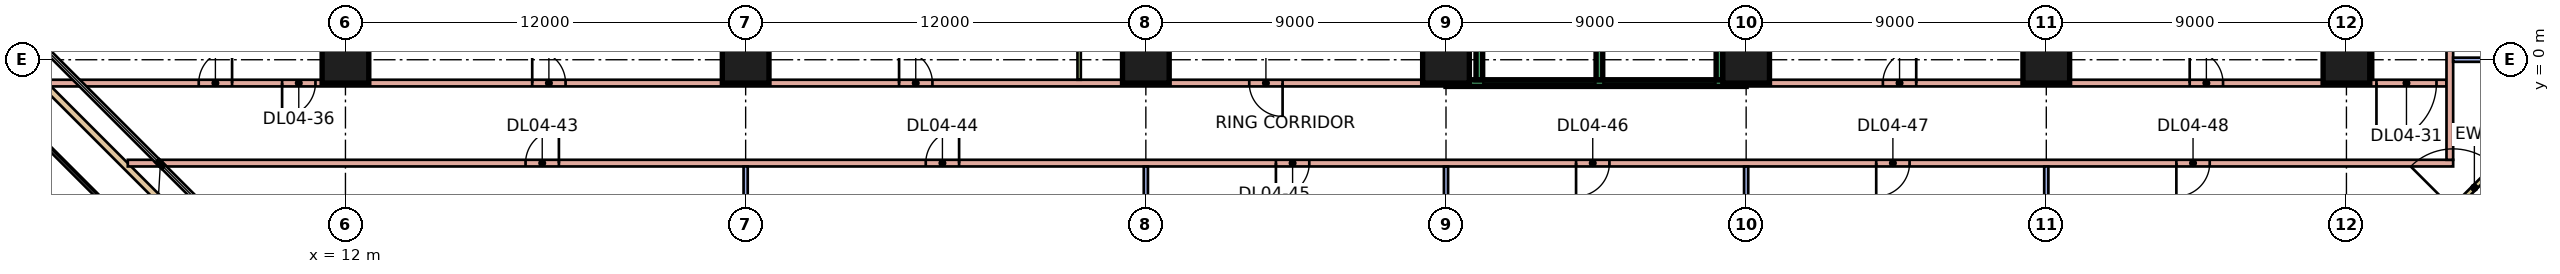
"""IFC4 building model, lengths in metres.
Left out: names, types, materials, properties, quantities, classifications, styles, units other than length and angle.
Written with IfcOpenShell. Run it as: python <this file> out.ifc"""

import sys

from ifc_helpers import new_model, si_unit, direction, frame, frame_2d, origin, origin_2d, place, context, subcontext, project, spatial, rectangle, extrude, element, fill, save


model = new_model("IFC4")
c1 = context("Model", 3, precision=1e-05, world=origin(), true_north=direction((0.0, 1.0)))
c2 = subcontext(c1, "Body", "Model", "MODEL_VIEW")
j1 = project(units=[si_unit("LENGTHUNIT", "METRE"), si_unit("PLANEANGLEUNIT", "RADIAN")], contexts=[c1])
p1 = place(None, origin())
s1 = spatial("IfcSite", under=j1, at=p1, CompositionType="ELEMENT")
p2 = place(p1, origin())
s2 = spatial("IfcBuilding", under=s1, at=p2, CompositionType="ELEMENT")
p3 = place(p2, frame((0.0, 0.0, 21.6)))
s3 = spatial("IfcBuildingStorey", under=s2, at=p3, CompositionType="ELEMENT", Elevation=21.6)
for number, where, z_axis, x_axis in (
    (1, (12.0, 0.0, 0.0), (0.0, 0.0, 1.0), (1.0, 0.0, 0.0)),
    (2, (24.0, 0.0, 0.0), (0.0, 0.0, 1.0), (1.0, 0.0, 0.0)),
    (3, (36.0, 0.0, 0.0), (0.0, 0.0, 1.0), (1.0, 0.0, 0.0)),
    (4, (45.0, 0.0, 0.0), (0.0, 0.0, 1.0), (1.0, 0.0, 0.0)),
    (5, (54.0, 0.0, 0.0), (0.0, 0.0, 1.0), (1.0, 0.0, 0.0)),
    (6, (63.0, 0.0, 0.0), (0.0, 0.0, 1.0), (1.0, 0.0, 0.0)),
    (7, (72.0, 0.0, 0.0), (0.0, 0.0, 1.0), (1.0, 0.0, 0.0)),
):
    element("IfcColumn", number, at=place(p3, frame(where, z_axis=z_axis, x_axis=x_axis)), inside=s3, PredefinedType="COLUMN", context=c2, shape_type="SweptSolid", body=[
        extrude(rectangle(XDim=1.4, YDim=1.4, at=origin_2d()), origin(), (0.0, 0.0, 1.0), 4.8),
    ])
p4 = place(p3, frame((74.775, -4.897, 0.0), z_axis=(0.0, 0.0, 1.0), x_axis=(0.707106781187, 0.707106781187, 0.0)))
e8 = element("IfcWall", 8, at=p4, inside=s3, PredefinedType="SOLIDWALL", context=c2, shape_type="SweptSolid", body=[
    extrude(rectangle(XDim=3.0, YDim=0.15, at=frame_2d((1.5, 0.0))), origin(), (0.0, 0.0, 1.0), 4.4),
])
p5 = place(p4, frame((0.6, 0.0, 0.0)))
e9 = element("IfcOpeningElement", 9, at=p5, cuts=e8, PredefinedType="OPENING", context=c2, shape_type="SweptSolid", body=[
    extrude(rectangle(XDim=1.8, YDim=2.4, at=frame_2d((0.9, 1.2))), frame((0.0, 0.085, 0.0), z_axis=(0.0, -1.0, 0.0), x_axis=(1.0, 0.0, 0.0)), (0.0, 0.0, 1.0), 0.17),
])
p6 = place(p3, frame((79.7, -1.068, 0.0), z_axis=(0.0, 0.0, 1.0), x_axis=(-0.707106781187, -0.707106781187, 0.0)))
e10 = element("IfcWall", 10, at=p6, inside=s3, PredefinedType="PARAPET", context=c2, shape_type="SweptSolid", body=[
    extrude(rectangle(XDim=9.379, YDim=0.2, at=frame_2d((4.689, 0.0))), origin(), (0.0, 0.0, 1.0), 0.5),
])
p7 = place(p3, frame((9.932, -7.7, 0.0), z_axis=(0.0, 0.0, 1.0), x_axis=(-0.707106781187, 0.707106781187, 0.0)))
e11 = element("IfcWall", 11, at=p7, inside=s3, PredefinedType="PARAPET", context=c2, shape_type="SweptSolid", body=[
    extrude(rectangle(XDim=24.935, YDim=0.2, at=frame_2d((12.468, 0.0))), origin(), (0.0, 0.0, 1.0), 0.5),
])
p8 = place(p3, frame((3.073, -0.7, 0.0), z_axis=(0.0, 0.0, 1.0), x_axis=(1.0, 0.0, 0.0)))
e12 = element("IfcWall", 12, at=p8, inside=s3, PredefinedType="PARTITIONING", context=c2, shape_type="SweptSolid", body=[
    extrude(rectangle(XDim=41.927, YDim=0.2, at=frame_2d((20.963, 0.0))), origin(), (0.0, 0.0, 1.0), 4.4),
])
p9 = place(p8, frame((36.027, 0.0, 0.0)))
e13 = element("IfcOpeningElement", 13, at=p9, cuts=e12, PredefinedType="OPENING", context=c2, shape_type="SweptSolid", body=[
    extrude(rectangle(XDim=1.0, YDim=2.1, at=frame_2d((0.5, 1.05))), frame((0.0, 0.11, 0.0), z_axis=(0.0, -1.0, 0.0), x_axis=(1.0, 0.0, 0.0)), (0.0, 0.0, 1.0), 0.22),
])
p10 = place(p8, frame((4.527, 0.0, 0.0)))
e14 = element("IfcOpeningElement", 14, at=p10, cuts=e12, PredefinedType="OPENING", context=c2, shape_type="SweptSolid", body=[
    extrude(rectangle(XDim=1.0, YDim=2.1, at=frame_2d((0.5, 1.05))), frame((0.0, 0.11, 0.0), z_axis=(0.0, -1.0, 0.0), x_axis=(1.0, 0.0, 0.0)), (0.0, 0.0, 1.0), 0.22),
])
p11 = place(p8, frame((7.027, 0.0, 0.0)))
e15 = element("IfcOpeningElement", 15, at=p11, cuts=e12, PredefinedType="OPENING", context=c2, shape_type="SweptSolid", body=[
    extrude(rectangle(XDim=1.0, YDim=2.1, at=frame_2d((0.5, 1.05))), frame((0.0, 0.11, 0.0), z_axis=(0.0, -1.0, 0.0), x_axis=(1.0, 0.0, 0.0)), (0.0, 0.0, 1.0), 0.22),
])
p12 = place(p8, frame((14.527, 0.0, 0.0)))
e16 = element("IfcOpeningElement", 16, at=p12, cuts=e12, PredefinedType="OPENING", context=c2, shape_type="SweptSolid", body=[
    extrude(rectangle(XDim=1.0, YDim=2.1, at=frame_2d((0.5, 1.05))), frame((0.0, 0.11, 0.0), z_axis=(0.0, -1.0, 0.0), x_axis=(1.0, 0.0, 0.0)), (0.0, 0.0, 1.0), 0.22),
])
p13 = place(p8, frame((25.527, 0.0, 0.0)))
e17 = element("IfcOpeningElement", 17, at=p13, cuts=e12, PredefinedType="OPENING", context=c2, shape_type="SweptSolid", body=[
    extrude(rectangle(XDim=1.0, YDim=2.1, at=frame_2d((0.5, 1.05))), frame((0.0, 0.11, 0.0), z_axis=(0.0, -1.0, 0.0), x_axis=(1.0, 0.0, 0.0)), (0.0, 0.0, 1.0), 0.22),
])
p14 = place(p3, frame((5.473, -3.1, 0.0), z_axis=(0.0, 0.0, 1.0), x_axis=(1.0, 0.0, 0.0)))
e18 = element("IfcWall", 18, at=p14, inside=s3, PredefinedType="PARTITIONING", context=c2, shape_type="SweptSolid", body=[
    extrude(rectangle(XDim=69.727, YDim=0.2, at=frame_2d((34.863, 0.0))), origin(), (0.0, 0.0, 1.0), 4.4),
])
p15 = place(p14, frame((11.927, 0.0, 0.0)))
e19 = element("IfcOpeningElement", 19, at=p15, cuts=e18, PredefinedType="OPENING", context=c2, shape_type="SweptSolid", body=[
    extrude(rectangle(XDim=1.0, YDim=2.1, at=frame_2d((0.5, 1.05))), frame((0.0, 0.11, 0.0), z_axis=(0.0, -1.0, 0.0), x_axis=(1.0, 0.0, 0.0)), (0.0, 0.0, 1.0), 0.22),
])
p16 = place(p14, frame((23.927, 0.0, 0.0)))
e20 = element("IfcOpeningElement", 20, at=p16, cuts=e18, PredefinedType="OPENING", context=c2, shape_type="SweptSolid", body=[
    extrude(rectangle(XDim=1.0, YDim=2.1, at=frame_2d((0.5, 1.05))), frame((0.0, 0.11, 0.0), z_axis=(0.0, -1.0, 0.0), x_axis=(1.0, 0.0, 0.0)), (0.0, 0.0, 1.0), 0.22),
])
p17 = place(p14, frame((34.427, 0.0, 0.0)))
e21 = element("IfcOpeningElement", 21, at=p17, cuts=e18, PredefinedType="OPENING", context=c2, shape_type="SweptSolid", body=[
    extrude(rectangle(XDim=1.0, YDim=2.1, at=frame_2d((0.5, 1.05))), frame((0.0, 0.11, 0.0), z_axis=(0.0, -1.0, 0.0), x_axis=(1.0, 0.0, 0.0)), (0.0, 0.0, 1.0), 0.22),
])
p18 = place(p14, frame((43.427, 0.0, 0.0)))
e22 = element("IfcOpeningElement", 22, at=p18, cuts=e18, PredefinedType="OPENING", context=c2, shape_type="SweptSolid", body=[
    extrude(rectangle(XDim=1.0, YDim=2.1, at=frame_2d((0.5, 1.05))), frame((0.0, 0.11, 0.0), z_axis=(0.0, -1.0, 0.0), x_axis=(1.0, 0.0, 0.0)), (0.0, 0.0, 1.0), 0.22),
])
p19 = place(p14, frame((52.427, 0.0, 0.0)))
e23 = element("IfcOpeningElement", 23, at=p19, cuts=e18, PredefinedType="OPENING", context=c2, shape_type="SweptSolid", body=[
    extrude(rectangle(XDim=1.0, YDim=2.1, at=frame_2d((0.5, 1.05))), frame((0.0, 0.11, 0.0), z_axis=(0.0, -1.0, 0.0), x_axis=(1.0, 0.0, 0.0)), (0.0, 0.0, 1.0), 0.22),
])
p20 = place(p14, frame((61.427, 0.0, 0.0)))
e24 = element("IfcOpeningElement", 24, at=p20, cuts=e18, PredefinedType="OPENING", context=c2, shape_type="SweptSolid", body=[
    extrude(rectangle(XDim=1.0, YDim=2.1, at=frame_2d((0.5, 1.05))), frame((0.0, 0.11, 0.0), z_axis=(0.0, -1.0, 0.0), x_axis=(1.0, 0.0, 0.0)), (0.0, 0.0, 1.0), 0.22),
])
p21 = place(p3, frame((12.0, -0.6, 0.0), z_axis=(0.0, 0.0, 1.0), x_axis=(0.0, 1.0, 0.0)))
e25 = element("IfcWall", 25, at=p21, inside=s3, PredefinedType="PARTITIONING", context=c2, shape_type="SweptSolid", body=[
    extrude(rectangle(XDim=7.6, YDim=0.125, at=frame_2d((3.8, 0.0))), origin(), (0.0, 0.0, 1.0), 4.4),
])
p22 = place(p3, frame((24.0, -7.6, 0.0), z_axis=(0.0, 0.0, 1.0), x_axis=(0.0, 1.0, 0.0)))
e26 = element("IfcWall", 26, at=p22, inside=s3, PredefinedType="PARTITIONING", context=c2, shape_type="SweptSolid", body=[
    extrude(rectangle(XDim=4.4, YDim=0.125, at=frame_2d((2.2, 0.0))), origin(), (0.0, 0.0, 1.0), 4.4),
])
for number, where, z_axis, x_axis in (
    (27, (24.0, -0.6, 0.0), (0.0, 0.0, 1.0), (0.0, 1.0, 0.0)),
    (28, (34.0, -0.6, 0.0), (0.0, 0.0, 1.0), (0.0, 1.0, 0.0)),
):
    element("IfcWall", number, at=place(p3, frame(where, z_axis=z_axis, x_axis=x_axis)), inside=s3, PredefinedType="PARTITIONING", context=c2, shape_type="SweptSolid", body=[
        extrude(rectangle(XDim=7.6, YDim=0.1, at=frame_2d((3.8, 0.0))), origin(), (0.0, 0.0, 1.0), 4.4),
    ])
p23 = place(p3, frame((36.0, -6.851, 0.0), z_axis=(0.0, 0.0, 1.0), x_axis=(0.0, 1.0, 0.0)))
e29 = element("IfcWall", 29, at=p23, inside=s3, PredefinedType="PARTITIONING", context=c2, shape_type="SweptSolid", body=[
    extrude(rectangle(XDim=3.651, YDim=0.125, at=frame_2d((1.826, 0.0))), origin(), (0.0, 0.0, 1.0), 4.4),
])
p24 = place(p3, frame((45.0, -7.6, 0.0), z_axis=(0.0, 0.0, 1.0), x_axis=(0.0, 1.0, 0.0)))
e30 = element("IfcWall", 30, at=p24, inside=s3, PredefinedType="PARTITIONING", context=c2, shape_type="SweptSolid", body=[
    extrude(rectangle(XDim=4.4, YDim=0.125, at=frame_2d((2.2, 0.0))), origin(), (0.0, 0.0, 1.0), 4.4),
])
p25 = place(p3, frame((45.0, -0.7, 0.0), z_axis=(0.0, 0.0, 1.0), x_axis=(1.0, 0.0, 0.0)))
e31 = element("IfcWall", 31, at=p25, inside=s3, PredefinedType="SOLIDWALL", context=c2, shape_type="SweptSolid", body=[
    extrude(rectangle(XDim=9.0, YDim=0.2, at=frame_2d((4.5, 0.0))), origin(), (0.0, 0.0, 1.0), 4.4),
])
for number, where, z_axis, x_axis in (
    (32, (45.0, -0.6, 0.0), (0.0, 0.0, 1.0), (0.0, 1.0, 0.0)),
    (33, (49.6, -0.6, 0.0), (0.0, 0.0, 1.0), (0.0, 1.0, 0.0)),
):
    element("IfcWall", number, at=place(p3, frame(where, z_axis=z_axis, x_axis=x_axis)), inside=s3, PredefinedType="SOLIDWALL", context=c2, shape_type="SweptSolid", body=[
        extrude(rectangle(XDim=13.1, YDim=0.2, at=frame_2d((6.55, 0.0))), origin(), (0.0, 0.0, 1.0), 4.4),
    ])
p26 = place(p3, frame((54.0, -7.6, 0.0), z_axis=(0.0, 0.0, 1.0), x_axis=(0.0, 1.0, 0.0)))
e34 = element("IfcWall", 34, at=p26, inside=s3, PredefinedType="PARTITIONING", context=c2, shape_type="SweptSolid", body=[
    extrude(rectangle(XDim=4.4, YDim=0.125, at=frame_2d((2.2, 0.0))), origin(), (0.0, 0.0, 1.0), 4.4),
])
p27 = place(p3, frame((54.0, -0.7, 0.0), z_axis=(0.0, 0.0, 1.0), x_axis=(1.0, 0.0, 0.0)))
e35 = element("IfcWall", 35, at=p27, inside=s3, PredefinedType="PARTITIONING", context=c2, shape_type="SweptSolid", body=[
    extrude(rectangle(XDim=21.0, YDim=0.2, at=frame_2d((10.5, 0.0))), origin(), (0.0, 0.0, 1.0), 4.4),
])
p28 = place(p27, frame((4.1, 0.0, 0.0)))
e36 = element("IfcOpeningElement", 36, at=p28, cuts=e35, PredefinedType="OPENING", context=c2, shape_type="SweptSolid", body=[
    extrude(rectangle(XDim=1.0, YDim=2.1, at=frame_2d((0.5, 1.05))), frame((0.0, 0.11, 0.0), z_axis=(0.0, -1.0, 0.0), x_axis=(1.0, 0.0, 0.0)), (0.0, 0.0, 1.0), 0.22),
])
p29 = place(p27, frame((13.3, 0.0, 0.0)))
e37 = element("IfcOpeningElement", 37, at=p29, cuts=e35, PredefinedType="OPENING", context=c2, shape_type="SweptSolid", body=[
    extrude(rectangle(XDim=1.0, YDim=2.1, at=frame_2d((0.5, 1.05))), frame((0.0, 0.11, 0.0), z_axis=(0.0, -1.0, 0.0), x_axis=(1.0, 0.0, 0.0)), (0.0, 0.0, 1.0), 0.22),
])
p30 = place(p27, frame((18.9, 0.0, 0.0)))
e38 = element("IfcOpeningElement", 38, at=p30, cuts=e35, PredefinedType="OPENING", context=c2, shape_type="SweptSolid", body=[
    extrude(rectangle(XDim=1.8, YDim=2.1, at=frame_2d((0.9, 1.05))), frame((0.0, 0.11, 0.0), z_axis=(0.0, -1.0, 0.0), x_axis=(1.0, 0.0, 0.0)), (0.0, 0.0, 1.0), 0.22),
])
p31 = place(p3, frame((54.0, -0.6, 0.0), z_axis=(0.0, 0.0, 1.0), x_axis=(0.0, 1.0, 0.0)))
e39 = element("IfcWall", 39, at=p31, inside=s3, PredefinedType="SOLIDWALL", context=c2, shape_type="SweptSolid", body=[
    extrude(rectangle(XDim=13.1, YDim=0.2, at=frame_2d((6.55, 0.0))), origin(), (0.0, 0.0, 1.0), 4.4),
])
p32 = place(p3, frame((63.0, -7.6, 0.0), z_axis=(0.0, 0.0, 1.0), x_axis=(0.0, 1.0, 0.0)))
e40 = element("IfcWall", 40, at=p32, inside=s3, PredefinedType="PARTITIONING", context=c2, shape_type="SweptSolid", body=[
    extrude(rectangle(XDim=4.4, YDim=0.125, at=frame_2d((2.2, 0.0))), origin(), (0.0, 0.0, 1.0), 4.4),
])
p33 = place(p3, frame((63.0, -0.6, 0.0), z_axis=(0.0, 0.0, 1.0), x_axis=(0.0, 1.0, 0.0)))
e41 = element("IfcWall", 41, at=p33, inside=s3, PredefinedType="PARTITIONING", context=c2, shape_type="SweptSolid", body=[
    extrude(rectangle(XDim=13.1, YDim=0.1, at=frame_2d((6.55, 0.0))), origin(), (0.0, 0.0, 1.0), 4.4),
])
p34 = place(p3, frame((72.7, -0.6, 0.0), z_axis=(0.0, 0.0, 1.0), x_axis=(0.0, 1.0, 0.0)))
e42 = element("IfcWall", 42, at=p34, inside=s3, PredefinedType="PARTITIONING", context=c2, shape_type="SweptSolid", body=[
    extrude(rectangle(XDim=13.1, YDim=0.2, at=frame_2d((6.55, 0.0))), origin(), (0.0, 0.0, 1.0), 4.4),
])
p35 = place(p34, frame((6.05, 0.0, 0.0)))
e43 = element("IfcOpeningElement", 43, at=p35, cuts=e42, PredefinedType="OPENING", context=c2, shape_type="SweptSolid", body=[
    extrude(rectangle(XDim=1.0, YDim=2.1, at=frame_2d((0.5, 1.05))), frame((0.0, 0.11, 0.0), z_axis=(0.0, -1.0, 0.0), x_axis=(1.0, 0.0, 0.0)), (0.0, 0.0, 1.0), 0.22),
])
p36 = place(p3, frame((75.1, -3.0, 0.0), z_axis=(0.0, 0.0, 1.0), x_axis=(0.0, 1.0, 0.0)))
e44 = element("IfcWall", 44, at=p36, inside=s3, PredefinedType="PARTITIONING", context=c2, shape_type="SweptSolid", body=[
    extrude(rectangle(XDim=30.0, YDim=0.2, at=frame_2d((15.0, 0.0))), origin(), (0.0, 0.0, 1.0), 4.4),
])
p37 = place(p36, frame((8.4, 0.0, 0.0)))
e45 = element("IfcOpeningElement", 45, at=p37, cuts=e44, PredefinedType="OPENING", context=c2, shape_type="SweptSolid", body=[
    extrude(rectangle(XDim=1.0, YDim=2.1, at=frame_2d((0.5, 1.05))), frame((0.0, 0.11, 0.0), z_axis=(0.0, -1.0, 0.0), x_axis=(1.0, 0.0, 0.0)), (0.0, 0.0, 1.0), 0.22),
])
p38 = place(p36, frame((22.25, 0.0, 0.0)))
e46 = element("IfcOpeningElement", 46, at=p38, cuts=e44, PredefinedType="OPENING", context=c2, shape_type="SweptSolid", body=[
    extrude(rectangle(XDim=1.0, YDim=2.1, at=frame_2d((0.5, 1.05))), frame((0.0, 0.11, 0.0), z_axis=(0.0, -1.0, 0.0), x_axis=(1.0, 0.0, 0.0)), (0.0, 0.0, 1.0), 0.22),
])
p39 = place(p3, frame((75.2, 0.0, 0.0), z_axis=(0.0, 0.0, 1.0), x_axis=(1.0, 0.0, 0.0)))
e47 = element("IfcWall", 47, at=p39, inside=s3, PredefinedType="PARTITIONING", context=c2, shape_type="SweptSolid", body=[
    extrude(rectangle(XDim=4.4, YDim=0.125, at=frame_2d((2.2, 0.0))), origin(), (0.0, 0.0, 1.0), 4.4),
])
for number, where, z_axis, x_axis in (
    (48, (53.2, -0.6, 0.0), (0.0, 0.0, 1.0), (0.0, 1.0, 0.0)),
    (49, (46.0, -0.6, 0.0), (0.0, 0.0, 1.0), (0.0, 1.0, 0.0)),
):
    element("IfcWall", number, at=place(p3, frame(where, z_axis=z_axis, x_axis=x_axis)), inside=s3, PredefinedType="SOLIDWALL", context=c2, shape_type="SweptSolid", body=[
        extrude(rectangle(XDim=7.945, YDim=0.2, at=frame_2d((3.973, 0.0))), origin(), (0.0, 0.0, 1.0), 4.4),
    ])
p40 = place(p5, origin())
e50 = element("IfcDoor", 50, at=p40, inside=s3, OperationType="DOUBLE_DOOR_SINGLE_SWING", PredefinedType="DOOR", context=c2, shape_type="SweptSolid", body=[
    extrude(rectangle(XDim=1.8, YDim=2.4, at=frame_2d((0.9, 1.2))), frame((0.0, 0.025, 0.0), z_axis=(0.0, -1.0, 0.0), x_axis=(1.0, 0.0, 0.0)), (0.0, 0.0, 1.0), 0.05),
])
fill(e9, e50)
p41 = place(p9, origin())
e51 = element("IfcDoor", 51, at=p41, inside=s3, OperationType="SINGLE_SWING_RIGHT", PredefinedType="DOOR", context=c2, shape_type="SweptSolid", body=[
    extrude(rectangle(XDim=1.0, YDim=2.1, at=frame_2d((0.5, 1.05))), frame((0.0, 0.025, 0.0), z_axis=(0.0, -1.0, 0.0), x_axis=(1.0, 0.0, 0.0)), (0.0, 0.0, 1.0), 0.05),
])
fill(e13, e51)
p42 = place(p28, frame((1.0, 0.0, 0.0), z_axis=(0.0, 0.0, 1.0), x_axis=(-1.0, 0.0, 0.0)))
e52 = element("IfcDoor", 52, at=p42, inside=s3, OperationType="SINGLE_SWING_RIGHT", PredefinedType="DOOR", context=c2, shape_type="SweptSolid", body=[
    extrude(rectangle(XDim=1.0, YDim=2.1, at=frame_2d((0.5, 1.05))), frame((0.0, 0.025, 0.0), z_axis=(0.0, -1.0, 0.0), x_axis=(1.0, 0.0, 0.0)), (0.0, 0.0, 1.0), 0.05),
])
fill(e36, e52)
p43 = place(p29, origin())
e53 = element("IfcDoor", 53, at=p43, inside=s3, OperationType="SINGLE_SWING_LEFT", PredefinedType="DOOR", context=c2, shape_type="SweptSolid", body=[
    extrude(rectangle(XDim=1.0, YDim=2.1, at=frame_2d((0.5, 1.05))), frame((0.0, 0.025, 0.0), z_axis=(0.0, -1.0, 0.0), x_axis=(1.0, 0.0, 0.0)), (0.0, 0.0, 1.0), 0.05),
])
fill(e37, e53)
p44 = place(p30, frame((1.8, 0.0, 0.0), z_axis=(0.0, 0.0, 1.0), x_axis=(-1.0, 0.0, 0.0)))
e54 = element("IfcDoor", 54, at=p44, inside=s3, OperationType="DOUBLE_DOOR_SINGLE_SWING", PredefinedType="DOOR", context=c2, shape_type="SweptSolid", body=[
    extrude(rectangle(XDim=1.8, YDim=2.1, at=frame_2d((0.9, 1.05))), frame((0.0, 0.025, 0.0), z_axis=(0.0, -1.0, 0.0), x_axis=(1.0, 0.0, 0.0)), (0.0, 0.0, 1.0), 0.05),
])
fill(e38, e54)
p45 = place(p10, frame((1.0, 0.0, 0.0), z_axis=(0.0, 0.0, 1.0), x_axis=(-1.0, 0.0, 0.0)))
e55 = element("IfcDoor", 55, at=p45, inside=s3, OperationType="SINGLE_SWING_RIGHT", PredefinedType="DOOR", context=c2, shape_type="SweptSolid", body=[
    extrude(rectangle(XDim=1.0, YDim=2.1, at=frame_2d((0.5, 1.05))), frame((0.0, 0.025, 0.0), z_axis=(0.0, -1.0, 0.0), x_axis=(1.0, 0.0, 0.0)), (0.0, 0.0, 1.0), 0.05),
])
fill(e14, e55)
p46 = place(p11, frame((1.0, 0.0, 0.0), z_axis=(0.0, 0.0, 1.0), x_axis=(-1.0, 0.0, 0.0)))
e56 = element("IfcDoor", 56, at=p46, inside=s3, OperationType="SINGLE_SWING_LEFT", PredefinedType="DOOR", context=c2, shape_type="SweptSolid", body=[
    extrude(rectangle(XDim=1.0, YDim=2.1, at=frame_2d((0.5, 1.05))), frame((0.0, 0.025, 0.0), z_axis=(0.0, -1.0, 0.0), x_axis=(1.0, 0.0, 0.0)), (0.0, 0.0, 1.0), 0.05),
])
fill(e15, e56)
p47 = place(p12, origin())
e57 = element("IfcDoor", 57, at=p47, inside=s3, OperationType="SINGLE_SWING_LEFT", PredefinedType="DOOR", context=c2, shape_type="SweptSolid", body=[
    extrude(rectangle(XDim=1.0, YDim=2.1, at=frame_2d((0.5, 1.05))), frame((0.0, 0.025, 0.0), z_axis=(0.0, -1.0, 0.0), x_axis=(1.0, 0.0, 0.0)), (0.0, 0.0, 1.0), 0.05),
])
fill(e16, e57)
p48 = place(p13, origin())
e58 = element("IfcDoor", 58, at=p48, inside=s3, OperationType="SINGLE_SWING_LEFT", PredefinedType="DOOR", context=c2, shape_type="SweptSolid", body=[
    extrude(rectangle(XDim=1.0, YDim=2.1, at=frame_2d((0.5, 1.05))), frame((0.0, 0.025, 0.0), z_axis=(0.0, -1.0, 0.0), x_axis=(1.0, 0.0, 0.0)), (0.0, 0.0, 1.0), 0.05),
])
fill(e17, e58)
p49 = place(p15, frame((1.0, 0.0, 0.0), z_axis=(0.0, 0.0, 1.0), x_axis=(-1.0, 0.0, 0.0)))
e59 = element("IfcDoor", 59, at=p49, inside=s3, OperationType="SINGLE_SWING_RIGHT", PredefinedType="DOOR", context=c2, shape_type="SweptSolid", body=[
    extrude(rectangle(XDim=1.0, YDim=2.1, at=frame_2d((0.5, 1.05))), frame((0.0, 0.025, 0.0), z_axis=(0.0, -1.0, 0.0), x_axis=(1.0, 0.0, 0.0)), (0.0, 0.0, 1.0), 0.05),
])
fill(e19, e59)
p50 = place(p16, frame((1.0, 0.0, 0.0), z_axis=(0.0, 0.0, 1.0), x_axis=(-1.0, 0.0, 0.0)))
e60 = element("IfcDoor", 60, at=p50, inside=s3, OperationType="SINGLE_SWING_RIGHT", PredefinedType="DOOR", context=c2, shape_type="SweptSolid", body=[
    extrude(rectangle(XDim=1.0, YDim=2.1, at=frame_2d((0.5, 1.05))), frame((0.0, 0.025, 0.0), z_axis=(0.0, -1.0, 0.0), x_axis=(1.0, 0.0, 0.0)), (0.0, 0.0, 1.0), 0.05),
])
fill(e20, e60)
p51 = place(p17, frame((1.0, 0.0, 0.0), z_axis=(0.0, 0.0, 1.0), x_axis=(-1.0, 0.0, 0.0)))
e61 = element("IfcDoor", 61, at=p51, inside=s3, OperationType="SINGLE_SWING_LEFT", PredefinedType="DOOR", context=c2, shape_type="SweptSolid", body=[
    extrude(rectangle(XDim=1.0, YDim=2.1, at=frame_2d((0.5, 1.05))), frame((0.0, 0.025, 0.0), z_axis=(0.0, -1.0, 0.0), x_axis=(1.0, 0.0, 0.0)), (0.0, 0.0, 1.0), 0.05),
])
fill(e21, e61)
p52 = place(p18, frame((1.0, 0.0, 0.0), z_axis=(0.0, 0.0, 1.0), x_axis=(-1.0, 0.0, 0.0)))
e62 = element("IfcDoor", 62, at=p52, inside=s3, OperationType="SINGLE_SWING_LEFT", PredefinedType="DOOR", context=c2, shape_type="SweptSolid", body=[
    extrude(rectangle(XDim=1.0, YDim=2.1, at=frame_2d((0.5, 1.05))), frame((0.0, 0.025, 0.0), z_axis=(0.0, -1.0, 0.0), x_axis=(1.0, 0.0, 0.0)), (0.0, 0.0, 1.0), 0.05),
])
fill(e22, e62)
p53 = place(p19, frame((1.0, 0.0, 0.0), z_axis=(0.0, 0.0, 1.0), x_axis=(-1.0, 0.0, 0.0)))
e63 = element("IfcDoor", 63, at=p53, inside=s3, OperationType="SINGLE_SWING_LEFT", PredefinedType="DOOR", context=c2, shape_type="SweptSolid", body=[
    extrude(rectangle(XDim=1.0, YDim=2.1, at=frame_2d((0.5, 1.05))), frame((0.0, 0.025, 0.0), z_axis=(0.0, -1.0, 0.0), x_axis=(1.0, 0.0, 0.0)), (0.0, 0.0, 1.0), 0.05),
])
fill(e23, e63)
p54 = place(p20, frame((1.0, 0.0, 0.0), z_axis=(0.0, 0.0, 1.0), x_axis=(-1.0, 0.0, 0.0)))
e64 = element("IfcDoor", 64, at=p54, inside=s3, OperationType="SINGLE_SWING_LEFT", PredefinedType="DOOR", context=c2, shape_type="SweptSolid", body=[
    extrude(rectangle(XDim=1.0, YDim=2.1, at=frame_2d((0.5, 1.05))), frame((0.0, 0.025, 0.0), z_axis=(0.0, -1.0, 0.0), x_axis=(1.0, 0.0, 0.0)), (0.0, 0.0, 1.0), 0.05),
])
fill(e24, e64)
save(model, sys.argv[1])
